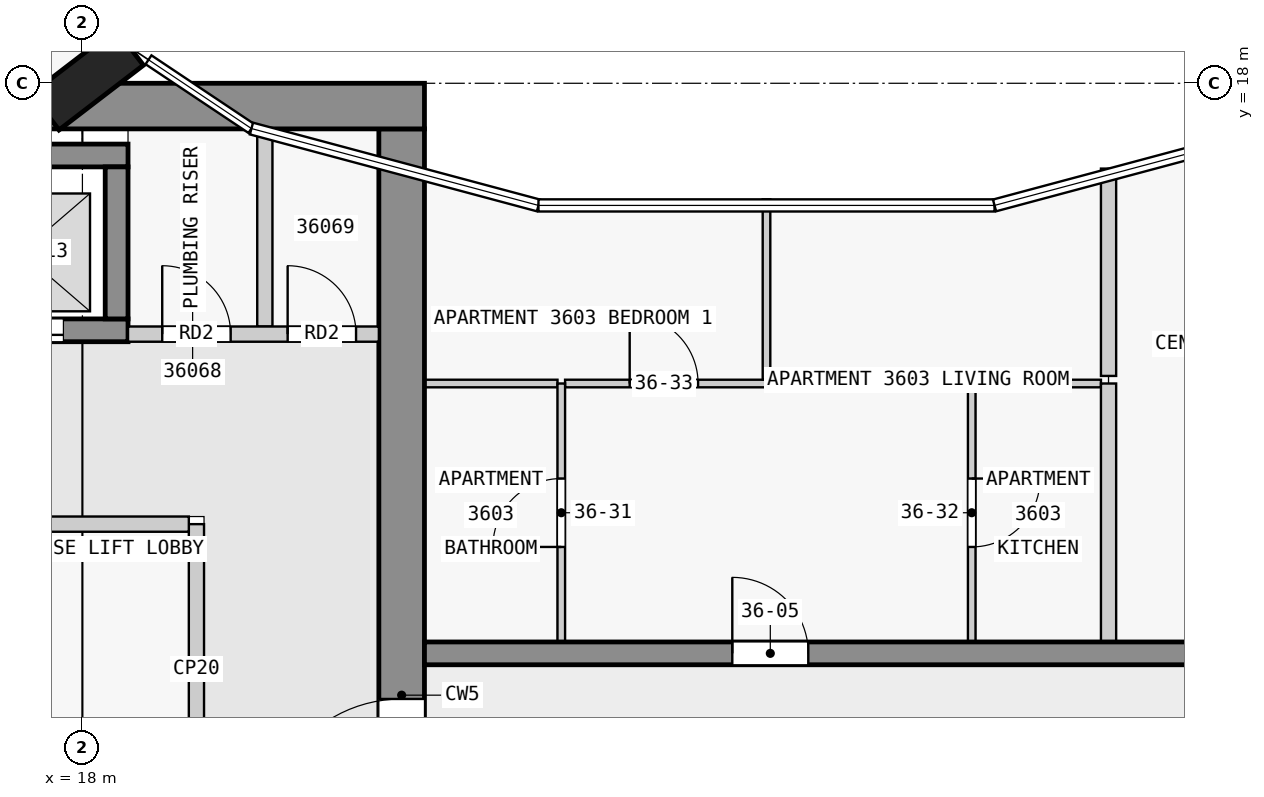
"""IFC4 building model, lengths in metres.
Left out: names, types, materials, properties, quantities, classifications, styles, units other than length and angle.
Written with IfcOpenShell. Run it as: python <this file> out.ifc"""

import sys

from ifc_helpers import new_model, si_unit, direction, frame, frame_2d, origin, origin_2d, place, context, subcontext, project, spatial, rectangle, extrude, element, fill, save


model = new_model("IFC4")
c1 = context("Model", 3, precision=1e-05, world=origin(), true_north=direction((0.0, 1.0)))
c2 = subcontext(c1, "Body", "Model", "MODEL_VIEW")
j1 = project(units=[si_unit("LENGTHUNIT", "METRE"), si_unit("PLANEANGLEUNIT", "RADIAN")], contexts=[c1])
p1 = place(None, origin())
s1 = spatial("IfcSite", under=j1, at=p1, CompositionType="ELEMENT")
p2 = place(p1, origin())
s2 = spatial("IfcBuilding", under=s1, at=p2, CompositionType="ELEMENT")
p3 = place(p2, frame((0.0, 0.0, 142.9)))
s3 = spatial("IfcBuildingStorey", under=s2, at=p3, CompositionType="ELEMENT", Elevation=142.9)
p4 = place(p3, frame((18.065, 18.05, 0.0), z_axis=(0.0, 0.0, 1.0), x_axis=(-0.608810846443, 0.793315418515, 0.0)))
e1 = element("IfcColumn", 1, at=p4, inside=s3, PredefinedType="COLUMN", context=c2, shape_type="SweptSolid", body=[
    extrude(rectangle(XDim=0.6, YDim=1.4, at=origin_2d()), origin(), (0.0, 0.0, 1.0), 3.5),
])
p5 = place(p3, frame((1.38, 17.7, 0.0), z_axis=(0.0, 0.0, 1.0), x_axis=(1.0, 0.0, 0.0)))
e2 = element("IfcWall", 2, at=p5, inside=s3, PredefinedType="SHEAR", context=c2, shape_type="SweptSolid", body=[
    extrude(rectangle(XDim=21.12, YDim=0.6, at=frame_2d((10.56, 0.0))), origin(), (0.0, 0.0, 1.0), 3.25),
])
p6 = place(p5, frame((6.4, 0.0, 0.0)))
e3 = element("IfcOpeningElement", 3, at=p6, cuts=e2, PredefinedType="OPENING", context=c2, shape_type="SweptSolid", body=[
    extrude(rectangle(XDim=1.8, YDim=2.1, at=frame_2d((0.9, 1.05))), frame((0.0, 0.31, 0.0), z_axis=(0.0, -1.0, 0.0), x_axis=(1.0, 0.0, 0.0)), (0.0, 0.0, 1.0), 0.62),
])
p7 = place(p3, frame((22.2, 2.5, 0.0), z_axis=(0.0, 0.0, 1.0), x_axis=(0.0, 1.0, 0.0)))
e4 = element("IfcWall", 4, at=p7, inside=s3, PredefinedType="SHEAR", context=c2, shape_type="SweptSolid", body=[
    extrude(rectangle(XDim=14.9, YDim=0.6, at=frame_2d((7.45, 0.0))), origin(), (0.0, 0.0, 1.0), 3.25),
])
p8 = place(p7, frame((5.6, 0.0, 0.0)))
e5 = element("IfcOpeningElement", 5, at=p8, cuts=e4, PredefinedType="OPENING", context=c2, shape_type="SweptSolid", body=[
    extrude(rectangle(XDim=1.8, YDim=2.1, at=frame_2d((0.9, 1.05))), frame((0.0, 0.31, 0.0), z_axis=(0.0, -1.0, 0.0), x_axis=(1.0, 0.0, 0.0)), (0.0, 0.0, 1.0), 0.62),
])
p9 = place(p3, frame((10.8, 17.05, 0.0), z_axis=(0.0, 0.0, 1.0), x_axis=(1.0, 0.0, 0.0)))
e6 = element("IfcWall", 6, at=p9, inside=s3, PredefinedType="SHEAR", context=c2, shape_type="SweptSolid", body=[
    extrude(rectangle(XDim=7.8, YDim=0.3, at=frame_2d((3.9, 0.0))), origin(), (0.0, 0.0, 1.0), 3.25),
])
p10 = place(p3, frame((10.8, 14.75, 0.0), z_axis=(0.0, 0.0, 1.0), x_axis=(1.0, 0.0, 0.0)))
e7 = element("IfcWall", 7, at=p10, inside=s3, PredefinedType="SHEAR", context=c2, shape_type="SweptSolid", body=[
    extrude(rectangle(XDim=7.8, YDim=0.3, at=frame_2d((3.9, 0.0))), origin(), (0.0, 0.0, 1.0), 3.25),
])
p11 = place(p10, frame((0.85, 0.0, 0.0)))
e8 = element("IfcOpeningElement", 8, at=p11, cuts=e7, PredefinedType="OPENING", context=c2, shape_type="SweptSolid", body=[
    extrude(rectangle(XDim=1.1, YDim=2.1, at=frame_2d((0.55, 1.05))), frame((0.0, 0.16, 0.0), z_axis=(0.0, -1.0, 0.0), x_axis=(1.0, 0.0, 0.0)), (0.0, 0.0, 1.0), 0.32),
])
p12 = place(p10, frame((3.35, 0.0, 0.0)))
e9 = element("IfcOpeningElement", 9, at=p12, cuts=e7, PredefinedType="OPENING", context=c2, shape_type="SweptSolid", body=[
    extrude(rectangle(XDim=1.1, YDim=2.1, at=frame_2d((0.55, 1.05))), frame((0.0, 0.16, 0.0), z_axis=(0.0, -1.0, 0.0), x_axis=(1.0, 0.0, 0.0)), (0.0, 0.0, 1.0), 0.32),
])
p13 = place(p10, frame((5.85, 0.0, 0.0)))
e10 = element("IfcOpeningElement", 10, at=p13, cuts=e7, PredefinedType="OPENING", context=c2, shape_type="SweptSolid", body=[
    extrude(rectangle(XDim=1.1, YDim=2.1, at=frame_2d((0.55, 1.05))), frame((0.0, 0.16, 0.0), z_axis=(0.0, -1.0, 0.0), x_axis=(1.0, 0.0, 0.0)), (0.0, 0.0, 1.0), 0.32),
])
p14 = place(p3, frame((18.45, 14.9, 0.0), z_axis=(0.0, 0.0, 1.0), x_axis=(0.0, 1.0, 0.0)))
e11 = element("IfcWall", 11, at=p14, inside=s3, PredefinedType="SHEAR", context=c2, shape_type="SweptSolid", body=[
    extrude(rectangle(XDim=2.0, YDim=0.3, at=frame_2d((1.0, 0.0))), origin(), (0.0, 0.0, 1.0), 3.25),
])
p15 = place(p3, frame((22.5, 10.5, 0.0), z_axis=(0.0, 0.0, 1.0), x_axis=(1.0, 0.0, 0.0)))
e12 = element("IfcWall", 12, at=p15, inside=s3, PredefinedType="SHEAR", context=c2, shape_type="SweptSolid", body=[
    extrude(rectangle(XDim=22.5, YDim=0.3, at=frame_2d((11.25, 0.0))), origin(), (0.0, 0.0, 1.0), 3.25),
])
p16 = place(p15, frame((4.05, 0.0, 0.0)))
e13 = element("IfcOpeningElement", 13, at=p16, cuts=e12, PredefinedType="OPENING", context=c2, shape_type="SweptSolid", body=[
    extrude(rectangle(XDim=1.0, YDim=2.1, at=frame_2d((0.5, 1.05))), frame((0.0, 0.16, 0.0), z_axis=(0.0, -1.0, 0.0), x_axis=(1.0, 0.0, 0.0)), (0.0, 0.0, 1.0), 0.32),
])
p17 = place(p15, frame((10.85, 0.0, 0.0)))
e14 = element("IfcOpeningElement", 14, at=p17, cuts=e12, PredefinedType="OPENING", context=c2, shape_type="SweptSolid", body=[
    extrude(rectangle(XDim=0.9, YDim=2.1, at=frame_2d((0.45, 1.05))), frame((0.0, 0.16, 0.0), z_axis=(0.0, -1.0, 0.0), x_axis=(1.0, 0.0, 0.0)), (0.0, 0.0, 1.0), 0.32),
])
p18 = place(p15, frame((15.25, 0.0, 0.0)))
e15 = element("IfcOpeningElement", 15, at=p18, cuts=e12, PredefinedType="OPENING", context=c2, shape_type="SweptSolid", body=[
    extrude(rectangle(XDim=1.0, YDim=2.1, at=frame_2d((0.5, 1.05))), frame((0.0, 0.16, 0.0), z_axis=(0.0, -1.0, 0.0), x_axis=(1.0, 0.0, 0.0)), (0.0, 0.0, 1.0), 0.32),
])
p19 = place(p15, frame((18.75, 0.0, 0.0)))
e16 = element("IfcOpeningElement", 16, at=p19, cuts=e12, PredefinedType="OPENING", context=c2, shape_type="SweptSolid", body=[
    extrude(rectangle(XDim=0.9, YDim=2.1, at=frame_2d((0.45, 1.05))), frame((0.0, 0.16, 0.0), z_axis=(0.0, -1.0, 0.0), x_axis=(1.0, 0.0, 0.0)), (0.0, 0.0, 1.0), 0.32),
])
p20 = place(p15, frame((20.95, 0.0, 0.0)))
e17 = element("IfcOpeningElement", 17, at=p20, cuts=e12, PredefinedType="OPENING", context=c2, shape_type="SweptSolid", body=[
    extrude(rectangle(XDim=1.0, YDim=2.1, at=frame_2d((0.5, 1.05))), frame((0.0, 0.16, 0.0), z_axis=(0.0, -1.0, 0.0), x_axis=(1.0, 0.0, 0.0)), (0.0, 0.0, 1.0), 0.32),
])
p21 = place(p3, frame((19.5, 8.4, 0.0), z_axis=(0.0, 0.0, 1.0), x_axis=(0.0, 1.0, 0.0)))
e18 = element("IfcWall", 18, at=p21, inside=s3, PredefinedType="PARTITIONING", context=c2, shape_type="SweptSolid", body=[
    extrude(rectangle(XDim=3.8, YDim=0.2, at=frame_2d((1.9, 0.0))), origin(), (0.0, 0.0, 1.0), 3.25),
])
p22 = place(p3, frame((10.9, 12.2, 0.0), z_axis=(0.0, 0.0, 1.0), x_axis=(1.0, 0.0, 0.0)))
e19 = element("IfcWall", 19, at=p22, inside=s3, PredefinedType="PARTITIONING", context=c2, shape_type="SweptSolid", body=[
    extrude(rectangle(XDim=8.5, YDim=0.2, at=frame_2d((4.25, 0.0))), origin(), (0.0, 0.0, 1.0), 3.25),
])
p23 = place(p22, frame((3.8, 0.0, 0.0)))
e20 = element("IfcOpeningElement", 20, at=p23, cuts=e19, PredefinedType="OPENING", context=c2, shape_type="SweptSolid", body=[
    extrude(rectangle(XDim=0.9, YDim=2.1, at=frame_2d((0.45, 1.05))), frame((0.0, 0.11, 0.0), z_axis=(0.0, -1.0, 0.0), x_axis=(1.0, 0.0, 0.0)), (0.0, 0.0, 1.0), 0.22),
])
p24 = place(p3, frame((18.6, 14.7, 0.0), z_axis=(0.0, 0.0, 1.0), x_axis=(1.0, 0.0, 0.0)))
e21 = element("IfcWall", 21, at=p24, inside=s3, PredefinedType="PARTITIONING", context=c2, shape_type="SweptSolid", body=[
    extrude(rectangle(XDim=3.3, YDim=0.2, at=frame_2d((1.65, 0.0))), origin(), (0.0, 0.0, 1.0), 3.25),
])
p25 = place(p24, frame((0.45, 0.0, 0.0)))
e22 = element("IfcOpeningElement", 22, at=p25, cuts=e21, PredefinedType="OPENING", context=c2, shape_type="SweptSolid", body=[
    extrude(rectangle(XDim=0.9, YDim=2.1, at=frame_2d((0.45, 1.05))), frame((0.0, 0.11, 0.0), z_axis=(0.0, -1.0, 0.0), x_axis=(1.0, 0.0, 0.0)), (0.0, 0.0, 1.0), 0.22),
])
p26 = place(p24, frame((2.1, 0.0, 0.0)))
e23 = element("IfcOpeningElement", 23, at=p26, cuts=e21, PredefinedType="OPENING", context=c2, shape_type="SweptSolid", body=[
    extrude(rectangle(XDim=0.9, YDim=2.1, at=frame_2d((0.45, 1.05))), frame((0.0, 0.11, 0.0), z_axis=(0.0, -1.0, 0.0), x_axis=(1.0, 0.0, 0.0)), (0.0, 0.0, 1.0), 0.22),
])
p27 = place(p3, frame((20.4, 14.8, 0.0), z_axis=(0.0, 0.0, 1.0), x_axis=(0.0, 1.0, 0.0)))
e24 = element("IfcWall", 24, at=p27, inside=s3, PredefinedType="PARTITIONING", context=c2, shape_type="SweptSolid", body=[
    extrude(rectangle(XDim=2.6, YDim=0.2, at=frame_2d((1.3, 0.0))), origin(), (0.0, 0.0, 1.0), 3.25),
])
p28 = place(p3, frame((24.25, 14.05, 0.0), z_axis=(0.0, 0.0, 1.0), x_axis=(-1.0, 0.0, 0.0)))
e25 = element("IfcWall", 25, at=p28, inside=s3, PredefinedType="PARTITIONING", context=c2, shape_type="SweptSolid", body=[
    extrude(rectangle(XDim=1.75, YDim=0.1, at=frame_2d((0.875, 0.0))), origin(), (0.0, 0.0, 1.0), 3.25),
])
p29 = place(p3, frame((31.4, 14.05, 0.0), z_axis=(0.0, 0.0, 1.0), x_axis=(-1.0, 0.0, 0.0)))
e26 = element("IfcWall", 26, at=p29, inside=s3, PredefinedType="PARTITIONING", context=c2, shape_type="SweptSolid", body=[
    extrude(rectangle(XDim=1.65, YDim=0.1, at=frame_2d((0.825, 0.0))), origin(), (0.0, 0.0, 1.0), 3.25),
])
p30 = place(p3, frame((24.35, 14.05, 0.0), z_axis=(0.0, 0.0, 1.0), x_axis=(1.0, 0.0, 0.0)))
e27 = element("IfcWall", 27, at=p30, inside=s3, PredefinedType="PARTITIONING", context=c2, shape_type="SweptSolid", body=[
    extrude(rectangle(XDim=2.65, YDim=0.1, at=frame_2d((1.325, 0.0))), origin(), (0.0, 0.0, 1.0), 3.25),
])
p31 = place(p30, frame((0.85, 0.0, 0.0)))
e28 = element("IfcOpeningElement", 28, at=p31, cuts=e27, PredefinedType="OPENING", context=c2, shape_type="SweptSolid", body=[
    extrude(rectangle(XDim=0.9, YDim=2.1, at=frame_2d((0.45, 1.05))), frame((0.0, 0.06, 0.0), z_axis=(0.0, -1.0, 0.0), x_axis=(1.0, 0.0, 0.0)), (0.0, 0.0, 1.0), 0.12),
])
p32 = place(p3, frame((24.3, 10.65, 0.0), z_axis=(0.0, 0.0, 1.0), x_axis=(0.0, 1.0, 0.0)))
e29 = element("IfcWall", 29, at=p32, inside=s3, PredefinedType="PARTITIONING", context=c2, shape_type="SweptSolid", body=[
    extrude(rectangle(XDim=3.4, YDim=0.1, at=frame_2d((1.7, 0.0))), origin(), (0.0, 0.0, 1.0), 3.25),
])
p33 = place(p32, frame((1.25, 0.0, 0.0)))
e30 = element("IfcOpeningElement", 30, at=p33, cuts=e29, PredefinedType="OPENING", context=c2, shape_type="SweptSolid", body=[
    extrude(rectangle(XDim=0.9, YDim=2.1, at=frame_2d((0.45, 1.05))), frame((0.0, 0.06, 0.0), z_axis=(0.0, -1.0, 0.0), x_axis=(1.0, 0.0, 0.0)), (0.0, 0.0, 1.0), 0.12),
])
p34 = place(p3, frame((27.0, 14.1, 0.0), z_axis=(0.0, 0.0, 1.0), x_axis=(0.0, 1.0, 0.0)))
e31 = element("IfcWall", 31, at=p34, inside=s3, PredefinedType="PARTITIONING", context=c2, shape_type="SweptSolid", body=[
    extrude(rectangle(XDim=2.373, YDim=0.1, at=frame_2d((1.187, 0.0))), origin(), (0.0, 0.0, 1.0), 3.25),
])
p35 = place(p3, frame((29.7, 14.05, 0.0), z_axis=(0.0, 0.0, 1.0), x_axis=(0.0, -1.0, 0.0)))
e32 = element("IfcWall", 32, at=p35, inside=s3, PredefinedType="PARTITIONING", context=c2, shape_type="SweptSolid", body=[
    extrude(rectangle(XDim=3.4, YDim=0.1, at=frame_2d((1.7, 0.0))), origin(), (0.0, 0.0, 1.0), 3.25),
])
p36 = place(p35, frame((1.25, 0.0, 0.0)))
e33 = element("IfcOpeningElement", 33, at=p36, cuts=e32, PredefinedType="OPENING", context=c2, shape_type="SweptSolid", body=[
    extrude(rectangle(XDim=0.9, YDim=2.1, at=frame_2d((0.45, 1.05))), frame((0.0, 0.06, 0.0), z_axis=(0.0, -1.0, 0.0), x_axis=(1.0, 0.0, 0.0)), (0.0, 0.0, 1.0), 0.12),
])
p37 = place(p3, frame((31.5, 16.878, 0.0), z_axis=(0.0, 0.0, 1.0), x_axis=(0.0, -1.0, 0.0)))
e34 = element("IfcWall", 34, at=p37, inside=s3, PredefinedType="PARTITIONING", context=c2, shape_type="SweptSolid", body=[
    extrude(rectangle(XDim=2.728, YDim=0.2, at=frame_2d((1.364, 0.0))), origin(), (0.0, 0.0, 1.0), 3.25),
])
p38 = place(p3, frame((31.5, 10.65, 0.0), z_axis=(0.0, 0.0, 1.0), x_axis=(0.0, 1.0, 0.0)))
e35 = element("IfcWall", 35, at=p38, inside=s3, PredefinedType="PARTITIONING", context=c2, shape_type="SweptSolid", body=[
    extrude(rectangle(XDim=3.4, YDim=0.2, at=frame_2d((1.7, 0.0))), origin(), (0.0, 0.0, 1.0), 3.25),
])
p39 = place(p13, origin())
e36 = element("IfcDoor", 36, at=p39, inside=s3, OperationType="DOUBLE_DOOR_SLIDING", PredefinedType="DOOR", context=c2, shape_type="SweptSolid", body=[
    extrude(rectangle(XDim=1.1, YDim=2.1, at=frame_2d((0.55, 1.05))), frame((0.0, 0.025, 0.0), z_axis=(0.0, -1.0, 0.0), x_axis=(1.0, 0.0, 0.0)), (0.0, 0.0, 1.0), 0.05),
])
fill(e10, e36)
p40 = place(p8, origin())
e37 = element("IfcDoor", 37, at=p40, inside=s3, OperationType="DOUBLE_DOOR_SINGLE_SWING", PredefinedType="DOOR", context=c2, shape_type="SweptSolid", body=[
    extrude(rectangle(XDim=1.8, YDim=2.1, at=frame_2d((0.9, 1.05))), frame((0.0, 0.025, 0.0), z_axis=(0.0, -1.0, 0.0), x_axis=(1.0, 0.0, 0.0)), (0.0, 0.0, 1.0), 0.05),
])
fill(e5, e37)
p41 = place(p25, origin())
e38 = element("IfcDoor", 38, at=p41, inside=s3, OperationType="SINGLE_SWING_LEFT", PredefinedType="DOOR", context=c2, shape_type="SweptSolid", body=[
    extrude(rectangle(XDim=0.9, YDim=2.1, at=frame_2d((0.45, 1.05))), frame((0.0, 0.025, 0.0), z_axis=(0.0, -1.0, 0.0), x_axis=(1.0, 0.0, 0.0)), (0.0, 0.0, 1.0), 0.05),
])
fill(e22, e38)
p42 = place(p26, origin())
e39 = element("IfcDoor", 39, at=p42, inside=s3, OperationType="SINGLE_SWING_LEFT", PredefinedType="DOOR", context=c2, shape_type="SweptSolid", body=[
    extrude(rectangle(XDim=0.9, YDim=2.1, at=frame_2d((0.45, 1.05))), frame((0.0, 0.025, 0.0), z_axis=(0.0, -1.0, 0.0), x_axis=(1.0, 0.0, 0.0)), (0.0, 0.0, 1.0), 0.05),
])
fill(e23, e39)
p43 = place(p16, origin())
e40 = element("IfcDoor", 40, at=p43, inside=s3, OperationType="SINGLE_SWING_LEFT", PredefinedType="DOOR", context=c2, shape_type="SweptSolid", body=[
    extrude(rectangle(XDim=1.0, YDim=2.1, at=frame_2d((0.5, 1.05))), frame((0.0, 0.025, 0.0), z_axis=(0.0, -1.0, 0.0), x_axis=(1.0, 0.0, 0.0)), (0.0, 0.0, 1.0), 0.05),
])
fill(e13, e40)
p44 = place(p33, origin())
e41 = element("IfcDoor", 41, at=p44, inside=s3, OperationType="SINGLE_SWING_LEFT", PredefinedType="DOOR", context=c2, shape_type="SweptSolid", body=[
    extrude(rectangle(XDim=0.9, YDim=2.1, at=frame_2d((0.45, 1.05))), frame((0.0, 0.025, 0.0), z_axis=(0.0, -1.0, 0.0), x_axis=(1.0, 0.0, 0.0)), (0.0, 0.0, 1.0), 0.05),
])
fill(e30, e41)
p45 = place(p36, origin())
e42 = element("IfcDoor", 42, at=p45, inside=s3, OperationType="SINGLE_SWING_LEFT", PredefinedType="DOOR", context=c2, shape_type="SweptSolid", body=[
    extrude(rectangle(XDim=0.9, YDim=2.1, at=frame_2d((0.45, 1.05))), frame((0.0, 0.025, 0.0), z_axis=(0.0, -1.0, 0.0), x_axis=(1.0, 0.0, 0.0)), (0.0, 0.0, 1.0), 0.05),
])
fill(e33, e42)
p46 = place(p31, origin())
e43 = element("IfcDoor", 43, at=p46, inside=s3, OperationType="SINGLE_SWING_LEFT", PredefinedType="DOOR", context=c2, shape_type="SweptSolid", body=[
    extrude(rectangle(XDim=0.9, YDim=2.1, at=frame_2d((0.45, 1.05))), frame((0.0, 0.025, 0.0), z_axis=(0.0, -1.0, 0.0), x_axis=(1.0, 0.0, 0.0)), (0.0, 0.0, 1.0), 0.05),
])
fill(e28, e43)
save(model, sys.argv[1])
